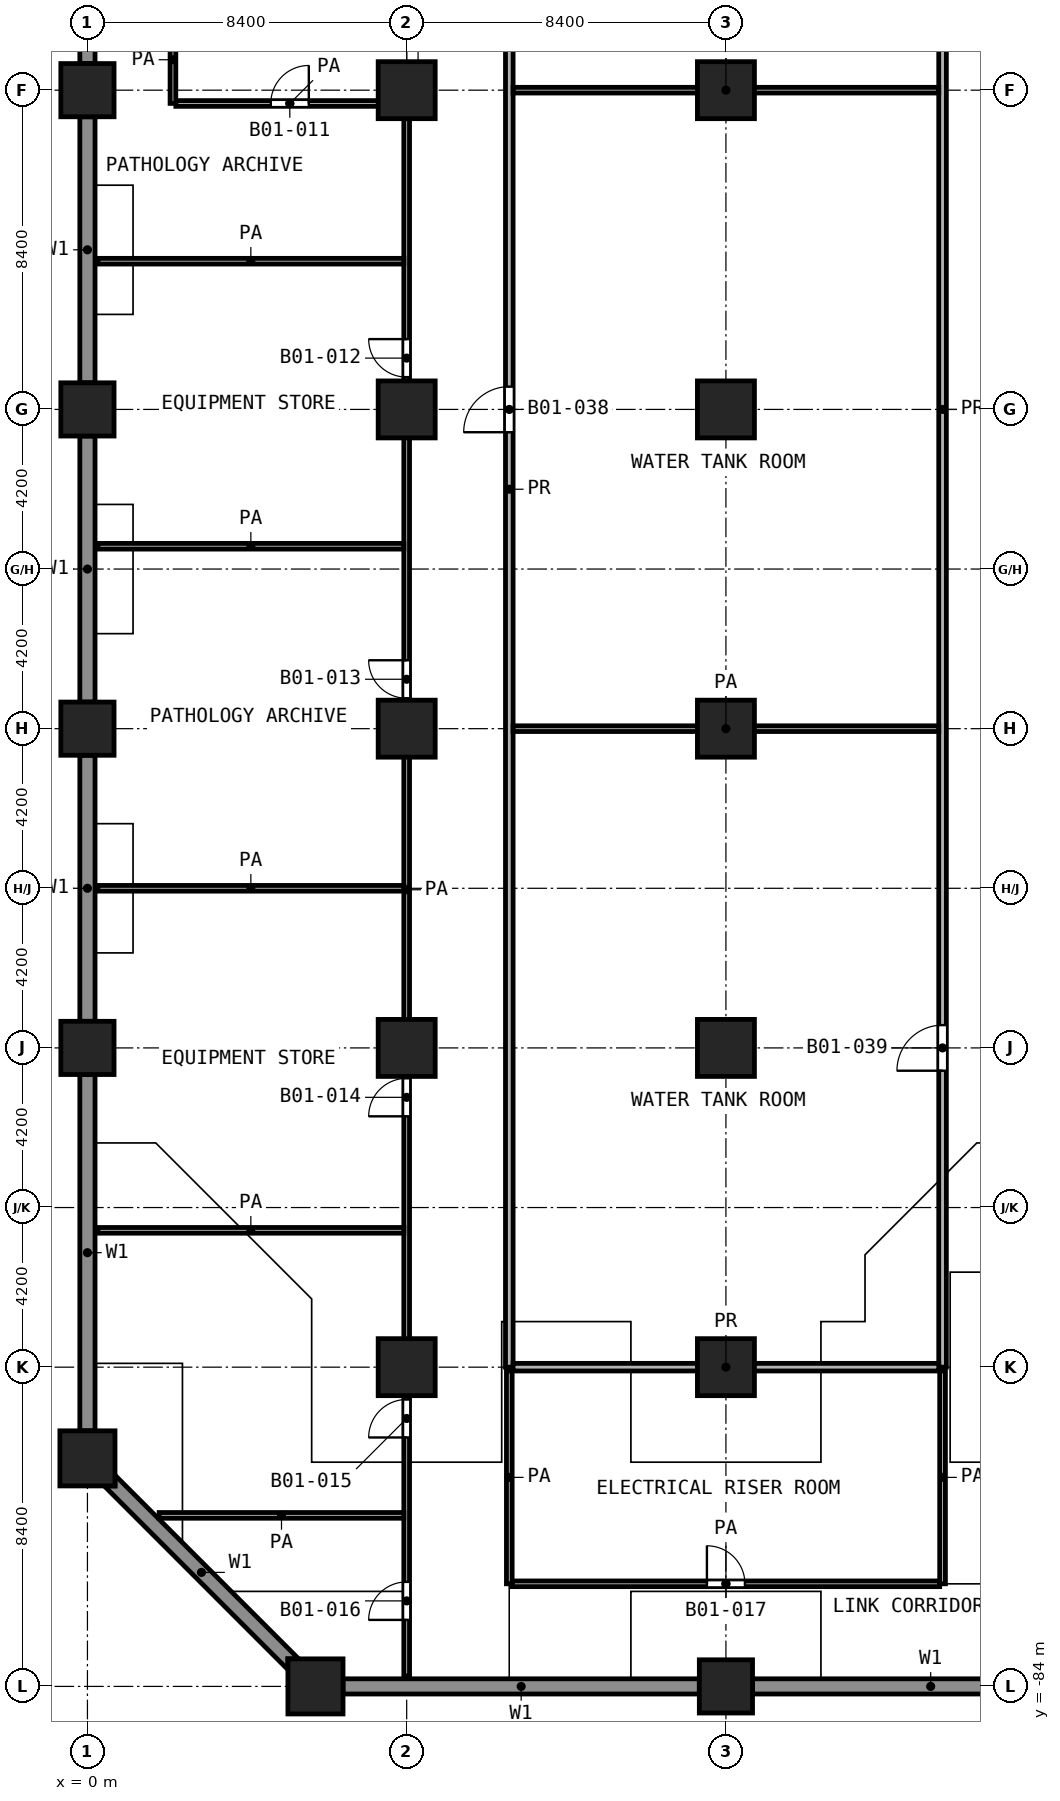
"""IFC4 building model, lengths in metres.
Left out: names, types, materials, properties, quantities, classifications, styles, units other than length and angle.
Written with IfcOpenShell. Run it as: python <this file> out.ifc"""

import sys

from ifc_helpers import new_model, si_unit, direction, frame, frame_2d, origin, origin_2d, place, context, subcontext, project, spatial, polyline, rectangle, outline, extrude, element, fill, save


model = new_model("IFC4")
c1 = context("Model", 3, precision=1e-05, world=origin(), true_north=direction((0.0, 1.0)))
c2 = subcontext(c1, "Body", "Model", "MODEL_VIEW")
j1 = project(units=[si_unit("LENGTHUNIT", "METRE"), si_unit("PLANEANGLEUNIT", "RADIAN")], contexts=[c1])
p1 = place(None, origin())
s1 = spatial("IfcSite", under=j1, at=p1, CompositionType="ELEMENT")
p2 = place(p1, origin())
s2 = spatial("IfcBuilding", under=s1, at=p2, CompositionType="ELEMENT")
p3 = place(p2, frame((0.0, 0.0, -6.0)))
s3 = spatial("IfcBuildingStorey", under=s2, at=p3, CompositionType="ELEMENT", Elevation=-6.0)
p4 = place(p3, origin())
e1 = element("IfcWall", 1, at=p4, inside=s3, PredefinedType="SOLIDWALL", context=c2, shape_type="SweptSolid", body=[
    extrude(outline(polyline([(0.2, -34.3), (0.2, -41.3), (-0.2, -41.3), (-0.2, -34.3), (0.2, -34.3)])), origin(), (0.0, 0.0, 1.0), 5.55),
])
e2 = element("IfcWall", 2, at=p4, inside=s3, PredefinedType="SOLIDWALL", context=c2, shape_type="SweptSolid", body=[
    extrude(outline(polyline([(0.2, -42.7), (0.2, -49.7), (-0.2, -49.7), (-0.2, -42.7), (0.2, -42.7)])), origin(), (0.0, 0.0, 1.0), 5.55),
])
e3 = element("IfcWall", 3, at=p4, inside=s3, PredefinedType="SOLIDWALL", context=c2, shape_type="SweptSolid", body=[
    extrude(outline(polyline([(0.2, -51.1), (0.2, -58.1), (-0.2, -58.1), (-0.2, -51.1), (0.2, -51.1)])), origin(), (0.0, 0.0, 1.0), 5.55),
])
e4 = element("IfcWall", 4, at=p4, inside=s3, PredefinedType="SOLIDWALL", context=c2, shape_type="SweptSolid", body=[
    extrude(outline(polyline([(0.2, -59.5), (0.2, -66.5), (-0.2, -66.5), (-0.2, -59.5), (0.2, -59.5)])), origin(), (0.0, 0.0, 1.0), 5.55),
])
e5 = element("IfcWall", 5, at=p4, inside=s3, PredefinedType="SOLIDWALL", context=c2, shape_type="SweptSolid", body=[
    extrude(outline(polyline([(0.2, -67.9), (0.2, -77.275), (-0.2, -77.275), (-0.2, -67.9), (0.2, -67.9)])), origin(), (0.0, 0.0, 1.0), 5.55),
])
e6 = element("IfcWall", 6, at=p4, inside=s3, PredefinedType="SOLIDWALL", context=c2, shape_type="SweptSolid", body=[
    extrude(outline(polyline([(0.725, -78.725), (0.725, -78.442), (5.558, -83.275), (5.275, -83.275), (5.275, -83.558), (0.442, -78.725), (0.725, -78.725)])), origin(), (0.0, 0.0, 1.0), 5.55),
])
e7 = element("IfcWall", 7, at=p4, inside=s3, PredefinedType="SOLIDWALL", context=c2, shape_type="SweptSolid", body=[
    extrude(outline(polyline([(6.725, -83.8), (16.1, -83.8), (16.1, -84.2), (6.725, -84.2), (6.725, -83.8)])), origin(), (0.0, 0.0, 1.0), 5.55),
])
e8 = element("IfcWall", 8, at=p4, inside=s3, PredefinedType="SOLIDWALL", context=c2, shape_type="SweptSolid", body=[
    extrude(outline(polyline([(17.5, -83.8), (26.875, -83.8), (26.875, -84.2), (17.5, -84.2), (17.5, -83.8)])), origin(), (0.0, 0.0, 1.0), 5.55),
])
p5 = place(p3, frame((0.0, -42.0, 0.0), z_axis=(0.0, 0.0, 1.0), x_axis=(1.0, 0.0, 0.0)))
e9 = element("IfcColumn", 9, at=p5, inside=s3, PredefinedType="COLUMN", context=c2, shape_type="SweptSolid", body=[
    extrude(rectangle(XDim=1.4, YDim=1.4, at=origin_2d()), origin(), (0.0, 0.0, 1.0), 6.0),
])
for number, where, z_axis, x_axis in (
    (10, (8.4, -42.0, 0.0), (0.0, 0.0, 1.0), (1.0, 0.0, 0.0)),
    (11, (16.8, -42.0, 0.0), (0.0, 0.0, 1.0), (1.0, 0.0, 0.0)),
):
    element("IfcColumn", number, at=place(p3, frame(where, z_axis=z_axis, x_axis=x_axis)), inside=s3, PredefinedType="COLUMN", context=c2, shape_type="SweptSolid", body=[
        extrude(rectangle(XDim=1.5, YDim=1.5, at=origin_2d()), origin(), (0.0, 0.0, 1.0), 6.0),
    ])
p6 = place(p3, frame((0.0, -50.4, 0.0), z_axis=(0.0, 0.0, 1.0), x_axis=(1.0, 0.0, 0.0)))
e12 = element("IfcColumn", 12, at=p6, inside=s3, PredefinedType="COLUMN", context=c2, shape_type="SweptSolid", body=[
    extrude(rectangle(XDim=1.4, YDim=1.4, at=origin_2d()), origin(), (0.0, 0.0, 1.0), 6.0),
])
for number, where, z_axis, x_axis in (
    (13, (8.4, -50.4, 0.0), (0.0, 0.0, 1.0), (1.0, 0.0, 0.0)),
    (14, (16.8, -50.4, 0.0), (0.0, 0.0, 1.0), (1.0, 0.0, 0.0)),
):
    element("IfcColumn", number, at=place(p3, frame(where, z_axis=z_axis, x_axis=x_axis)), inside=s3, PredefinedType="COLUMN", context=c2, shape_type="SweptSolid", body=[
        extrude(rectangle(XDim=1.5, YDim=1.5, at=origin_2d()), origin(), (0.0, 0.0, 1.0), 6.0),
    ])
p7 = place(p3, frame((0.0, -58.8, 0.0), z_axis=(0.0, 0.0, 1.0), x_axis=(1.0, 0.0, 0.0)))
e15 = element("IfcColumn", 15, at=p7, inside=s3, PredefinedType="COLUMN", context=c2, shape_type="SweptSolid", body=[
    extrude(rectangle(XDim=1.4, YDim=1.4, at=origin_2d()), origin(), (0.0, 0.0, 1.0), 6.0),
])
for number, where, z_axis, x_axis in (
    (16, (8.4, -58.8, 0.0), (0.0, 0.0, 1.0), (1.0, 0.0, 0.0)),
    (17, (16.8, -58.8, 0.0), (0.0, 0.0, 1.0), (1.0, 0.0, 0.0)),
):
    element("IfcColumn", number, at=place(p3, frame(where, z_axis=z_axis, x_axis=x_axis)), inside=s3, PredefinedType="COLUMN", context=c2, shape_type="SweptSolid", body=[
        extrude(rectangle(XDim=1.5, YDim=1.5, at=origin_2d()), origin(), (0.0, 0.0, 1.0), 6.0),
    ])
p8 = place(p3, frame((0.0, -67.2, 0.0), z_axis=(0.0, 0.0, 1.0), x_axis=(1.0, 0.0, 0.0)))
e18 = element("IfcColumn", 18, at=p8, inside=s3, PredefinedType="COLUMN", context=c2, shape_type="SweptSolid", body=[
    extrude(rectangle(XDim=1.4, YDim=1.4, at=origin_2d()), origin(), (0.0, 0.0, 1.0), 6.0),
])
for number, where, z_axis, x_axis in (
    (19, (8.4, -67.2, 0.0), (0.0, 0.0, 1.0), (1.0, 0.0, 0.0)),
    (20, (16.8, -67.2, 0.0), (0.0, 0.0, 1.0), (1.0, 0.0, 0.0)),
    (21, (8.4, -75.6, 0.0), (0.0, 0.0, 1.0), (1.0, 0.0, 0.0)),
    (22, (16.8, -75.6, 0.0), (0.0, 0.0, 1.0), (1.0, 0.0, 0.0)),
):
    element("IfcColumn", number, at=place(p3, frame(where, z_axis=z_axis, x_axis=x_axis)), inside=s3, PredefinedType="COLUMN", context=c2, shape_type="SweptSolid", body=[
        extrude(rectangle(XDim=1.5, YDim=1.5, at=origin_2d()), origin(), (0.0, 0.0, 1.0), 6.0),
    ])
for number, where, z_axis, x_axis in (
    (23, (0.0, -78.0, 0.0), (0.0, 0.0, 1.0), (1.0, 0.0, 0.0)),
    (24, (6.0, -84.0, 0.0), (0.0, 0.0, 1.0), (1.0, 0.0, 0.0)),
):
    element("IfcColumn", number, at=place(p3, frame(where, z_axis=z_axis, x_axis=x_axis)), inside=s3, PredefinedType="COLUMN", context=c2, shape_type="SweptSolid", body=[
        extrude(rectangle(XDim=1.45, YDim=1.45, at=origin_2d()), origin(), (0.0, 0.0, 1.0), 6.0),
    ])
p9 = place(p3, frame((16.8, -84.0, 0.0), z_axis=(0.0, 0.0, 1.0), x_axis=(1.0, 0.0, 0.0)))
e25 = element("IfcColumn", 25, at=p9, inside=s3, PredefinedType="COLUMN", context=c2, shape_type="SweptSolid", body=[
    extrude(rectangle(XDim=1.4, YDim=1.4, at=origin_2d()), origin(), (0.0, 0.0, 1.0), 6.0),
])
p10 = place(p3, frame((11.175, -81.3, 0.0), z_axis=(0.0, 0.0, 1.0), x_axis=(1.0, 0.0, 0.0)))
e26 = element("IfcWall", 26, at=p10, inside=s3, PredefinedType="PARTITIONING", context=c2, shape_type="SweptSolid", body=[
    extrude(rectangle(XDim=11.25, YDim=0.15, at=frame_2d((5.625, 0.0))), origin(), (0.0, 0.0, 1.0), 5.55),
])
p11 = place(p10, frame((5.125, 0.0, 0.0)))
e27 = element("IfcOpeningElement", 27, at=p11, cuts=e26, PredefinedType="OPENING", context=c2, shape_type="SweptSolid", body=[
    extrude(rectangle(XDim=1.0, YDim=2.1, at=frame_2d((0.5, 1.05))), frame((0.0, 0.085, 0.0), z_axis=(0.0, -1.0, 0.0), x_axis=(1.0, 0.0, 0.0)), (0.0, 0.0, 1.0), 0.17),
])
p12 = place(p3, frame((1.887, -79.5, 0.0), z_axis=(0.0, 0.0, 1.0), x_axis=(1.0, 0.0, 0.0)))
e28 = element("IfcWall", 28, at=p12, inside=s3, PredefinedType="PARTITIONING", context=c2, shape_type="SweptSolid", body=[
    extrude(rectangle(XDim=6.438, YDim=0.15, at=frame_2d((3.219, 0.0))), origin(), (0.0, 0.0, 1.0), 5.55),
])
for number, where, z_axis, x_axis in (
    (29, (0.274, -72.0, 0.0), (0.0, 0.0, 1.0), (1.0, 0.0, 0.0)),
    (30, (0.274, -63.0, 0.0), (0.0, 0.0, 1.0), (1.0, 0.0, 0.0)),
):
    element("IfcWall", number, at=place(p3, frame(where, z_axis=z_axis, x_axis=x_axis)), inside=s3, PredefinedType="PARTITIONING", context=c2, shape_type="SweptSolid", body=[
        extrude(rectangle(XDim=8.051, YDim=0.15, at=frame_2d((4.025, 0.0))), origin(), (0.0, 0.0, 1.0), 5.55),
    ])
p13 = place(p3, frame((11.2, -58.8, 0.0), z_axis=(0.0, 0.0, 1.0), x_axis=(1.0, 0.0, 0.0)))
e31 = element("IfcWall", 31, at=p13, inside=s3, PredefinedType="PARTITIONING", context=c2, shape_type="SweptSolid", body=[
    extrude(rectangle(XDim=11.2, YDim=0.15, at=frame_2d((5.6, 0.0))), origin(), (0.0, 0.0, 1.0), 5.55),
])
for number, where, z_axis, x_axis in (
    (32, (0.274, -54.0, 0.0), (0.0, 0.0, 1.0), (1.0, 0.0, 0.0)),
    (33, (0.274, -46.5, 0.0), (0.0, 0.0, 1.0), (1.0, 0.0, 0.0)),
):
    element("IfcWall", number, at=place(p3, frame(where, z_axis=z_axis, x_axis=x_axis)), inside=s3, PredefinedType="PARTITIONING", context=c2, shape_type="SweptSolid", body=[
        extrude(rectangle(XDim=8.051, YDim=0.15, at=frame_2d((4.025, 0.0))), origin(), (0.0, 0.0, 1.0), 5.55),
    ])
p14 = place(p3, frame((2.326, -42.35, 0.0), z_axis=(0.0, 0.0, 1.0), x_axis=(1.0, 0.0, 0.0)))
e34 = element("IfcWall", 34, at=p14, inside=s3, PredefinedType="PARTITIONING", context=c2, shape_type="SweptSolid", body=[
    extrude(rectangle(XDim=5.999, YDim=0.15, at=frame_2d((3.0, 0.0))), origin(), (0.0, 0.0, 1.0), 5.55),
])
p15 = place(p14, frame((2.499, 0.0, 0.0)))
e35 = element("IfcOpeningElement", 35, at=p15, cuts=e34, PredefinedType="OPENING", context=c2, shape_type="SweptSolid", body=[
    extrude(rectangle(XDim=1.0, YDim=2.1, at=frame_2d((0.5, 1.05))), frame((0.0, 0.085, 0.0), z_axis=(0.0, -1.0, 0.0), x_axis=(1.0, 0.0, 0.0)), (0.0, 0.0, 1.0), 0.17),
])
p16 = place(p3, frame((11.2, -42.0, 0.0), z_axis=(0.0, 0.0, 1.0), x_axis=(1.0, 0.0, 0.0)))
e36 = element("IfcWall", 36, at=p16, inside=s3, PredefinedType="PARTITIONING", context=c2, shape_type="SweptSolid", body=[
    extrude(rectangle(XDim=11.2, YDim=0.15, at=frame_2d((5.6, 0.0))), origin(), (0.0, 0.0, 1.0), 5.55),
])
p17 = place(p3, frame((2.25, -42.348, 0.0), z_axis=(0.0, 0.0, 1.0), x_axis=(0.0, 1.0, 0.0)))
e37 = element("IfcWall", 37, at=p17, inside=s3, PredefinedType="PARTITIONING", context=c2, shape_type="SweptSolid", body=[
    extrude(rectangle(XDim=2.298, YDim=0.15, at=frame_2d((1.149, 0.0))), origin(), (0.0, 0.0, 1.0), 5.55),
])
p18 = place(p3, frame((8.4, -83.726, 0.0), z_axis=(0.0, 0.0, 1.0), x_axis=(0.0, 1.0, 0.0)))
e38 = element("IfcWall", 38, at=p18, inside=s3, PredefinedType="PARTITIONING", context=c2, shape_type="SweptSolid", body=[
    extrude(rectangle(XDim=41.376, YDim=0.15, at=frame_2d((20.688, 0.0))), origin(), (0.0, 0.0, 1.0), 5.55),
])
p19 = place(p18, frame((34.176, 0.0, 0.0)))
e39 = element("IfcOpeningElement", 39, at=p19, cuts=e38, PredefinedType="OPENING", context=c2, shape_type="SweptSolid", body=[
    extrude(rectangle(XDim=1.0, YDim=2.1, at=frame_2d((0.5, 1.05))), frame((0.0, 0.085, 0.0), z_axis=(0.0, -1.0, 0.0), x_axis=(1.0, 0.0, 0.0)), (0.0, 0.0, 1.0), 0.17),
])
p20 = place(p18, frame((25.726, 0.0, 0.0)))
e40 = element("IfcOpeningElement", 40, at=p20, cuts=e38, PredefinedType="OPENING", context=c2, shape_type="SweptSolid", body=[
    extrude(rectangle(XDim=1.0, YDim=2.1, at=frame_2d((0.5, 1.05))), frame((0.0, 0.085, 0.0), z_axis=(0.0, -1.0, 0.0), x_axis=(1.0, 0.0, 0.0)), (0.0, 0.0, 1.0), 0.17),
])
p21 = place(p18, frame((14.726, 0.0, 0.0)))
e41 = element("IfcOpeningElement", 41, at=p21, cuts=e38, PredefinedType="OPENING", context=c2, shape_type="SweptSolid", body=[
    extrude(rectangle(XDim=1.0, YDim=2.1, at=frame_2d((0.5, 1.05))), frame((0.0, 0.085, 0.0), z_axis=(0.0, -1.0, 0.0), x_axis=(1.0, 0.0, 0.0)), (0.0, 0.0, 1.0), 0.17),
])
p22 = place(p18, frame((6.276, 0.0, 0.0)))
e42 = element("IfcOpeningElement", 42, at=p22, cuts=e38, PredefinedType="OPENING", context=c2, shape_type="SweptSolid", body=[
    extrude(rectangle(XDim=1.0, YDim=2.1, at=frame_2d((0.5, 1.05))), frame((0.0, 0.085, 0.0), z_axis=(0.0, -1.0, 0.0), x_axis=(1.0, 0.0, 0.0)), (0.0, 0.0, 1.0), 0.17),
])
p23 = place(p18, frame((1.476, 0.0, 0.0)))
e43 = element("IfcOpeningElement", 43, at=p23, cuts=e38, PredefinedType="OPENING", context=c2, shape_type="SweptSolid", body=[
    extrude(rectangle(XDim=1.0, YDim=2.1, at=frame_2d((0.5, 1.05))), frame((0.0, 0.085, 0.0), z_axis=(0.0, -1.0, 0.0), x_axis=(1.0, 0.0, 0.0)), (0.0, 0.0, 1.0), 0.17),
])
for number, where, z_axis, x_axis in (
    (44, (11.1, -81.3, 0.0), (0.0, 0.0, 1.0), (0.0, 1.0, 0.0)),
    (45, (22.5, -81.3, 0.0), (0.0, 0.0, 1.0), (0.0, 1.0, 0.0)),
):
    element("IfcWall", number, at=place(p3, frame(where, z_axis=z_axis, x_axis=x_axis)), inside=s3, PredefinedType="PARTITIONING", context=c2, shape_type="SweptSolid", body=[
        extrude(rectangle(XDim=5.6, YDim=0.15, at=frame_2d((2.8, 0.0))), origin(), (0.0, 0.0, 1.0), 5.55),
    ])
p24 = place(p3, frame((11.2, -75.6, 0.0), z_axis=(0.0, 0.0, 1.0), x_axis=(1.0, 0.0, 0.0)))
e46 = element("IfcWall", 46, at=p24, inside=s3, PredefinedType="PARTITIONING", context=c2, shape_type="SweptSolid", body=[
    extrude(rectangle(XDim=11.2, YDim=0.2, at=frame_2d((5.6, 0.0))), origin(), (0.0, 0.0, 1.0), 5.55),
])
p25 = place(p3, frame((11.1, -75.6, 0.0), z_axis=(0.0, 0.0, 1.0), x_axis=(0.0, 1.0, 0.0)))
e47 = element("IfcWall", 47, at=p25, inside=s3, PredefinedType="PARTITIONING", context=c2, shape_type="SweptSolid", body=[
    extrude(rectangle(XDim=46.2, YDim=0.2, at=frame_2d((23.1, 0.0))), origin(), (0.0, 0.0, 1.0), 5.55),
])
p26 = place(p25, frame((24.6, 0.0, 0.0)))
e48 = element("IfcOpeningElement", 48, at=p26, cuts=e47, PredefinedType="OPENING", context=c2, shape_type="SweptSolid", body=[
    extrude(rectangle(XDim=1.2, YDim=2.1, at=frame_2d((0.6, 1.05))), frame((0.0, 0.11, 0.0), z_axis=(0.0, -1.0, 0.0), x_axis=(1.0, 0.0, 0.0)), (0.0, 0.0, 1.0), 0.22),
])
p27 = place(p3, frame((22.5, -75.6, 0.0), z_axis=(0.0, 0.0, 1.0), x_axis=(0.0, 1.0, 0.0)))
e49 = element("IfcWall", 49, at=p27, inside=s3, PredefinedType="PARTITIONING", context=c2, shape_type="SweptSolid", body=[
    extrude(rectangle(XDim=50.4, YDim=0.2, at=frame_2d((25.2, 0.0))), origin(), (0.0, 0.0, 1.0), 5.55),
])
p28 = place(p27, frame((45.6, 0.0, 0.0)))
e50 = element("IfcOpeningElement", 50, at=p28, cuts=e49, PredefinedType="OPENING", context=c2, shape_type="SweptSolid", body=[
    extrude(rectangle(XDim=1.2, YDim=2.1, at=frame_2d((0.6, 1.05))), frame((0.0, 0.11, 0.0), z_axis=(0.0, -1.0, 0.0), x_axis=(1.0, 0.0, 0.0)), (0.0, 0.0, 1.0), 0.22),
])
p29 = place(p27, frame((37.2, 0.0, 0.0)))
e51 = element("IfcOpeningElement", 51, at=p29, cuts=e49, PredefinedType="OPENING", context=c2, shape_type="SweptSolid", body=[
    extrude(rectangle(XDim=1.2, YDim=2.1, at=frame_2d((0.6, 1.05))), frame((0.0, 0.11, 0.0), z_axis=(0.0, -1.0, 0.0), x_axis=(1.0, 0.0, 0.0)), (0.0, 0.0, 1.0), 0.22),
])
p30 = place(p27, frame((7.8, 0.0, 0.0)))
e52 = element("IfcOpeningElement", 52, at=p30, cuts=e49, PredefinedType="OPENING", context=c2, shape_type="SweptSolid", body=[
    extrude(rectangle(XDim=1.2, YDim=2.1, at=frame_2d((0.6, 1.05))), frame((0.0, 0.11, 0.0), z_axis=(0.0, -1.0, 0.0), x_axis=(1.0, 0.0, 0.0)), (0.0, 0.0, 1.0), 0.22),
])
p31 = place(p15, origin())
e53 = element("IfcDoor", 53, at=p31, inside=s3, OperationType="SINGLE_SWING_RIGHT", PredefinedType="DOOR", context=c2, shape_type="SweptSolid", body=[
    extrude(rectangle(XDim=1.0, YDim=2.1, at=frame_2d((0.5, 1.05))), frame((0.0, 0.025, 0.0), z_axis=(0.0, -1.0, 0.0), x_axis=(1.0, 0.0, 0.0)), (0.0, 0.0, 1.0), 0.05),
])
fill(e35, e53)
p32 = place(p19, origin())
e54 = element("IfcDoor", 54, at=p32, inside=s3, OperationType="SINGLE_SWING_RIGHT", PredefinedType="DOOR", context=c2, shape_type="SweptSolid", body=[
    extrude(rectangle(XDim=1.0, YDim=2.1, at=frame_2d((0.5, 1.05))), frame((0.0, 0.025, 0.0), z_axis=(0.0, -1.0, 0.0), x_axis=(1.0, 0.0, 0.0)), (0.0, 0.0, 1.0), 0.05),
])
fill(e39, e54)
p33 = place(p20, origin())
e55 = element("IfcDoor", 55, at=p33, inside=s3, OperationType="SINGLE_SWING_RIGHT", PredefinedType="DOOR", context=c2, shape_type="SweptSolid", body=[
    extrude(rectangle(XDim=1.0, YDim=2.1, at=frame_2d((0.5, 1.05))), frame((0.0, 0.025, 0.0), z_axis=(0.0, -1.0, 0.0), x_axis=(1.0, 0.0, 0.0)), (0.0, 0.0, 1.0), 0.05),
])
fill(e40, e55)
p34 = place(p21, origin())
e56 = element("IfcDoor", 56, at=p34, inside=s3, OperationType="SINGLE_SWING_LEFT", PredefinedType="DOOR", context=c2, shape_type="SweptSolid", body=[
    extrude(rectangle(XDim=1.0, YDim=2.1, at=frame_2d((0.5, 1.05))), frame((0.0, 0.025, 0.0), z_axis=(0.0, -1.0, 0.0), x_axis=(1.0, 0.0, 0.0)), (0.0, 0.0, 1.0), 0.05),
])
fill(e41, e56)
p35 = place(p22, origin())
e57 = element("IfcDoor", 57, at=p35, inside=s3, OperationType="SINGLE_SWING_LEFT", PredefinedType="DOOR", context=c2, shape_type="SweptSolid", body=[
    extrude(rectangle(XDim=1.0, YDim=2.1, at=frame_2d((0.5, 1.05))), frame((0.0, 0.025, 0.0), z_axis=(0.0, -1.0, 0.0), x_axis=(1.0, 0.0, 0.0)), (0.0, 0.0, 1.0), 0.05),
])
fill(e42, e57)
p36 = place(p23, origin())
e58 = element("IfcDoor", 58, at=p36, inside=s3, OperationType="SINGLE_SWING_LEFT", PredefinedType="DOOR", context=c2, shape_type="SweptSolid", body=[
    extrude(rectangle(XDim=1.0, YDim=2.1, at=frame_2d((0.5, 1.05))), frame((0.0, 0.025, 0.0), z_axis=(0.0, -1.0, 0.0), x_axis=(1.0, 0.0, 0.0)), (0.0, 0.0, 1.0), 0.05),
])
fill(e43, e58)
p37 = place(p26, origin())
e59 = element("IfcDoor", 59, at=p37, inside=s3, OperationType="SINGLE_SWING_LEFT", PredefinedType="DOOR", context=c2, shape_type="SweptSolid", body=[
    extrude(rectangle(XDim=1.2, YDim=2.1, at=frame_2d((0.6, 1.05))), frame((0.0, 0.025, 0.0), z_axis=(0.0, -1.0, 0.0), x_axis=(1.0, 0.0, 0.0)), (0.0, 0.0, 1.0), 0.05),
])
fill(e48, e59)
p38 = place(p30, origin())
e60 = element("IfcDoor", 60, at=p38, inside=s3, OperationType="SINGLE_SWING_LEFT", PredefinedType="DOOR", context=c2, shape_type="SweptSolid", body=[
    extrude(rectangle(XDim=1.2, YDim=2.1, at=frame_2d((0.6, 1.05))), frame((0.0, 0.025, 0.0), z_axis=(0.0, -1.0, 0.0), x_axis=(1.0, 0.0, 0.0)), (0.0, 0.0, 1.0), 0.05),
])
fill(e52, e60)
p39 = place(p11, origin())
e61 = element("IfcDoor", 61, at=p39, inside=s3, OperationType="SINGLE_SWING_LEFT", PredefinedType="DOOR", context=c2, shape_type="SweptSolid", body=[
    extrude(rectangle(XDim=1.0, YDim=2.1, at=frame_2d((0.5, 1.05))), frame((0.0, 0.025, 0.0), z_axis=(0.0, -1.0, 0.0), x_axis=(1.0, 0.0, 0.0)), (0.0, 0.0, 1.0), 0.05),
])
fill(e27, e61)
save(model, sys.argv[1])
